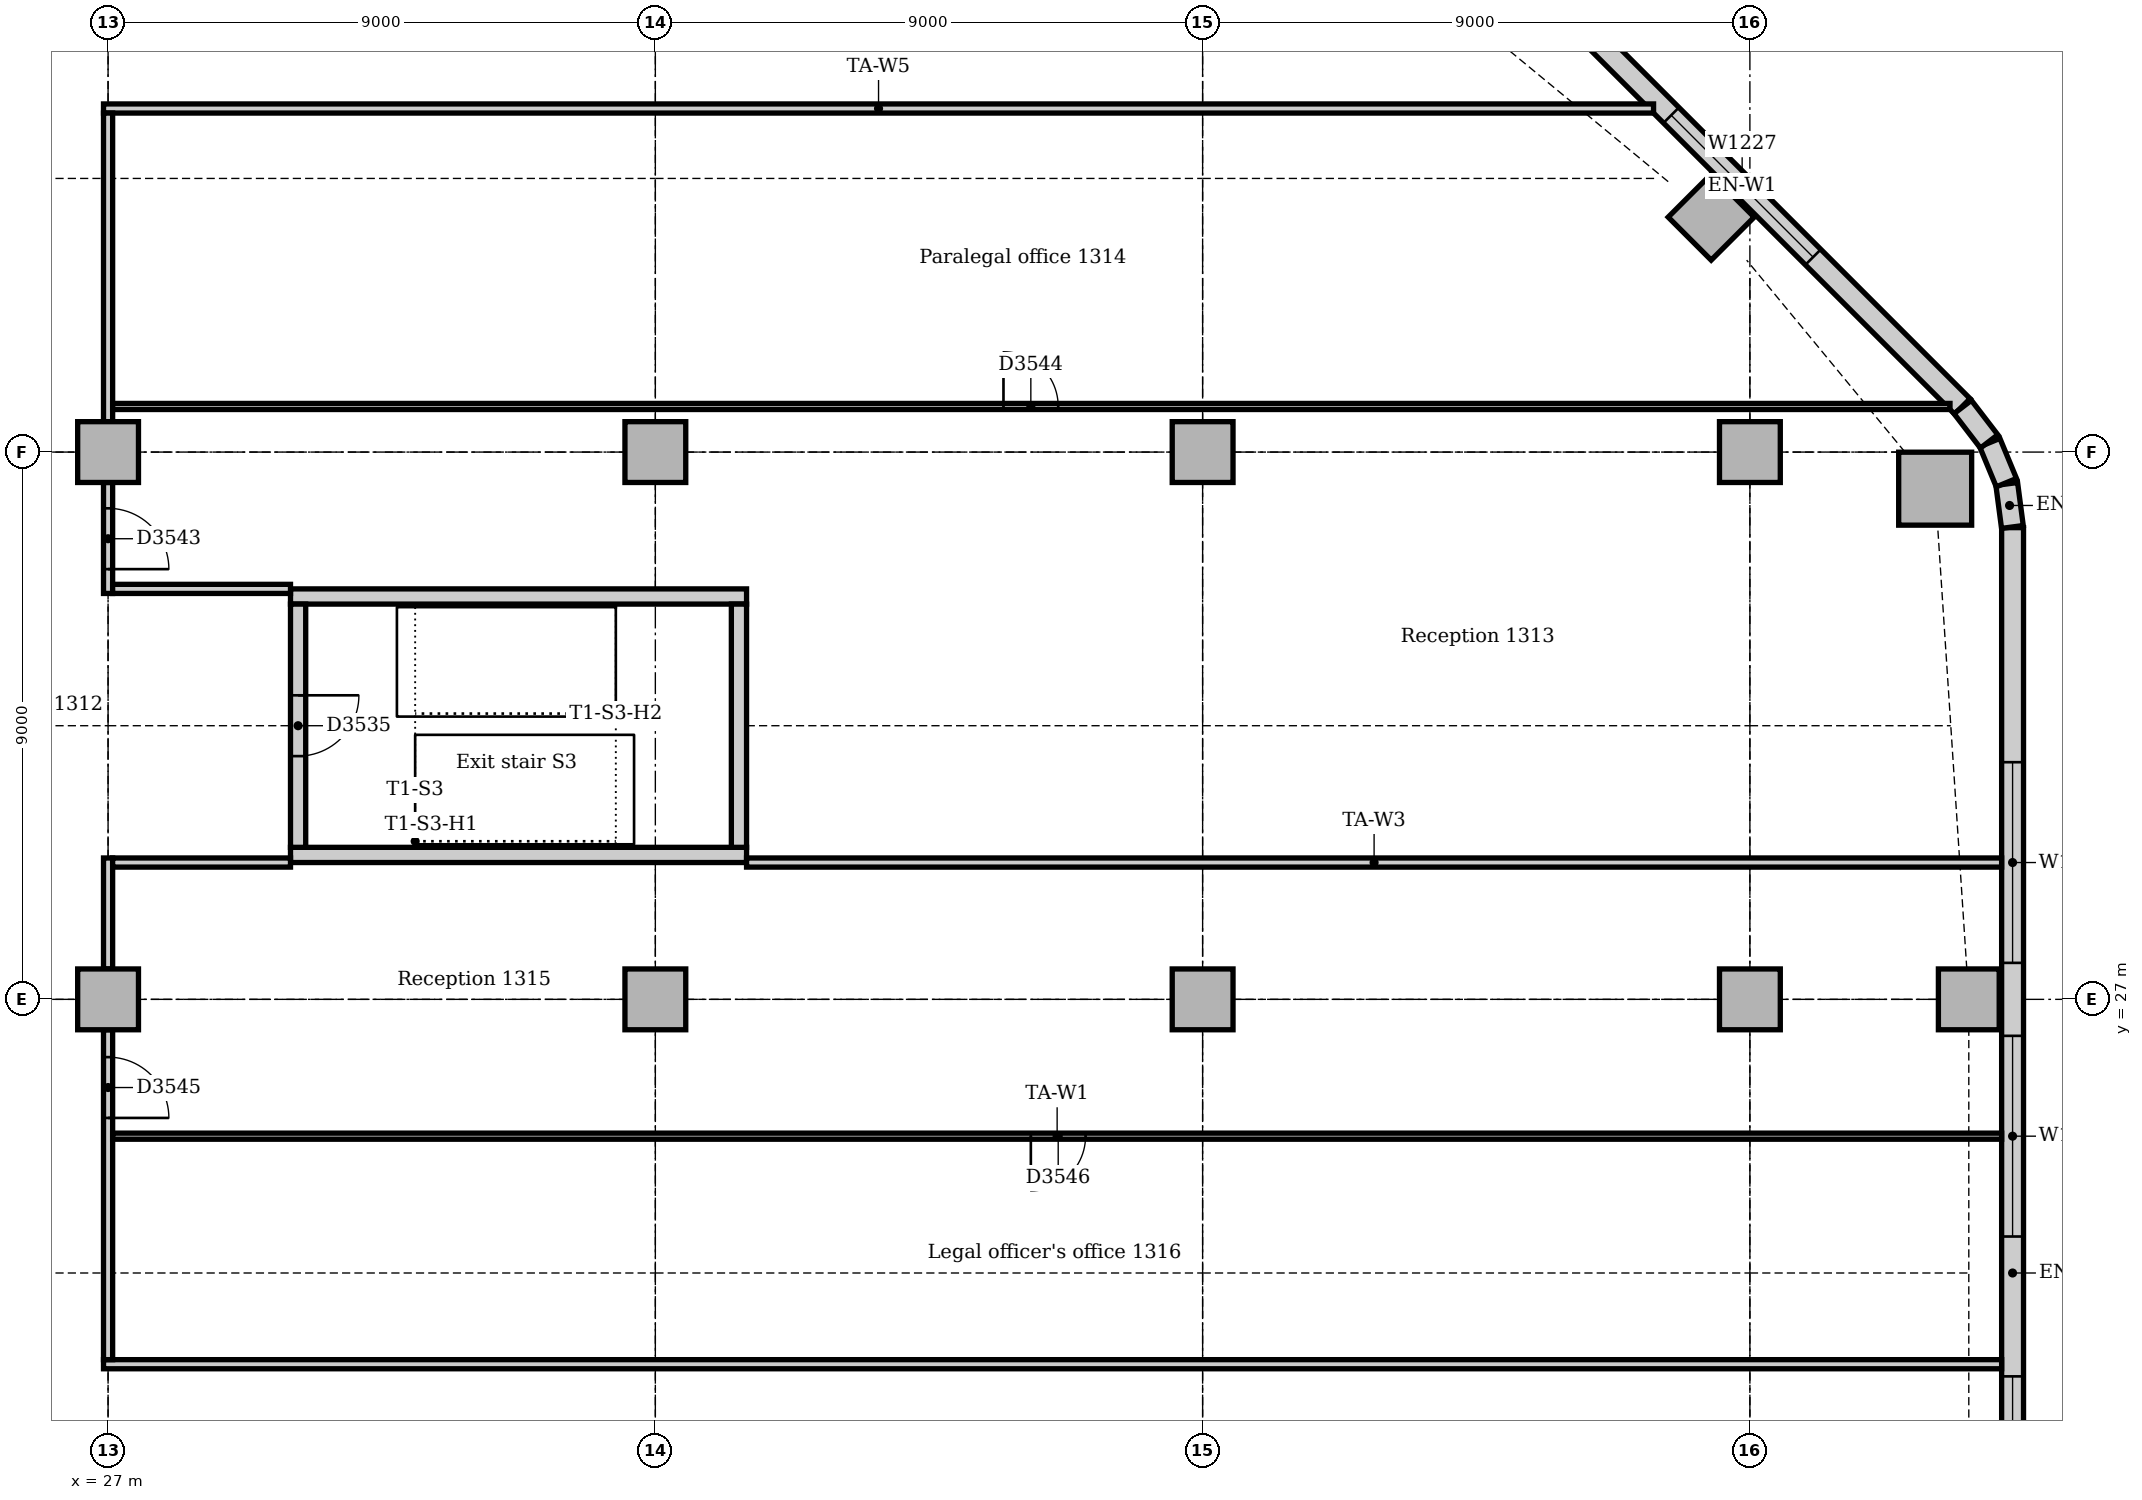
"""IFC4 building model, lengths in metres.
Left out: names, types, materials, properties, quantities, classifications, styles, units other than length and angle.
Written with IfcOpenShell. Run it as: python <this file> out.ifc"""

import sys

from ifc_helpers import new_model, si_unit, direction, frame, frame_2d, origin, origin_2d, place, context, subcontext, project, spatial, rectangle, extrude, element, fill, save


model = new_model("IFC4")
c1 = context("Model", 3, precision=1e-05, world=origin(), true_north=direction((0.0, 1.0)))
c2 = subcontext(c1, "Body", "Model", "MODEL_VIEW")
j1 = project(units=[si_unit("LENGTHUNIT", "METRE"), si_unit("PLANEANGLEUNIT", "RADIAN")], contexts=[c1])
p1 = place(None, origin())
s1 = spatial("IfcSite", under=j1, at=p1, CompositionType="ELEMENT")
p2 = place(p1, origin())
s2 = spatial("IfcBuilding", under=s1, at=p2, CompositionType="ELEMENT")
p3 = place(p2, frame((0.0, 0.0, 59.0)))
s3 = spatial("IfcBuildingStorey", under=s2, at=p3, CompositionType="ELEMENT", Elevation=59.0)
for number, where, z_axis, x_axis in (
    (1, (30.0, 29.375, 0.0), (0.0, 0.0, 1.0), (1.0, 0.0, 0.0)),
    (2, (37.5, 33.625, 0.0), (0.0, 0.0, 1.0), (-1.0, 0.0, 0.0)),
):
    element("IfcWall", number, at=place(p3, frame(where, z_axis=z_axis, x_axis=x_axis)), inside=s3, PredefinedType="SOLIDWALL", context=c2, shape_type="SweptSolid", body=[
        extrude(rectangle(XDim=7.5, YDim=0.25, at=frame_2d((3.75, 0.0))), origin(), (0.0, 0.0, 1.0), 4.0),
    ])
p4 = place(p3, frame((37.375, 29.5, 0.0), z_axis=(0.0, 0.0, 1.0), x_axis=(0.0, 1.0, 0.0)))
e3 = element("IfcWall", 3, at=p4, inside=s3, PredefinedType="SOLIDWALL", context=c2, shape_type="SweptSolid", body=[
    extrude(rectangle(XDim=4.0, YDim=0.25, at=frame_2d((2.0, 0.0))), origin(), (0.0, 0.0, 1.0), 4.0),
])
p5 = place(p3, frame((30.125, 33.5, 0.0), z_axis=(0.0, 0.0, 1.0), x_axis=(0.0, -1.0, 0.0)))
e4 = element("IfcWall", 4, at=p5, inside=s3, PredefinedType="SOLIDWALL", context=c2, shape_type="SweptSolid", body=[
    extrude(rectangle(XDim=4.0, YDim=0.25, at=frame_2d((2.0, 0.0))), origin(), (0.0, 0.0, 1.0), 4.0),
])
p6 = place(p5, frame((1.5, 0.0, 0.0)))
e5 = element("IfcOpeningElement", 5, at=p6, cuts=e4, PredefinedType="OPENING", context=c2, shape_type="SweptSolid", body=[
    extrude(rectangle(XDim=1.0, YDim=2.1, at=frame_2d((0.5, 1.05))), frame((0.0, 0.135, 0.0), z_axis=(0.0, -1.0, 0.0), x_axis=(1.0, 0.0, 0.0)), (0.0, 0.0, 1.0), 0.27),
])
p7 = place(p3, frame((57.047, 35.398, 0.0), z_axis=(0.0, 0.0, 1.0), x_axis=(1.0, 0.0, 0.0)))
e6 = element("IfcColumn", 6, at=p7, inside=s3, PredefinedType="COLUMN", context=c2, shape_type="SweptSolid", body=[
    extrude(rectangle(XDim=1.2, YDim=1.2, at=origin_2d()), origin(), (0.0, 0.0, 1.0), 3.85),
])
for number, where, z_axis, x_axis in (
    (7, (57.6, 27.0, 0.0), (0.0, 0.0, 1.0), (1.0, 0.0, 0.0)),
    (8, (53.364, 39.864, 0.0), (0.0, 0.0, 1.0), (0.707, 0.707, 0.0)),
    (9, (27.0, 27.0, 0.0), (0.0, 0.0, 1.0), (1.0, 0.0, 0.0)),
    (10, (27.0, 36.0, 0.0), (0.0, 0.0, 1.0), (1.0, 0.0, 0.0)),
    (11, (36.0, 27.0, 0.0), (0.0, 0.0, 1.0), (1.0, 0.0, 0.0)),
    (12, (36.0, 36.0, 0.0), (0.0, 0.0, 1.0), (1.0, 0.0, 0.0)),
    (13, (45.0, 27.0, 0.0), (0.0, 0.0, 1.0), (1.0, 0.0, 0.0)),
    (14, (45.0, 36.0, 0.0), (0.0, 0.0, 1.0), (1.0, 0.0, 0.0)),
    (15, (54.0, 27.0, 0.0), (0.0, 0.0, 1.0), (1.0, 0.0, 0.0)),
    (16, (54.0, 36.0, 0.0), (0.0, 0.0, 1.0), (1.0, 0.0, 0.0)),
):
    element("IfcColumn", number, at=place(p3, frame(where, z_axis=z_axis, x_axis=x_axis)), inside=s3, PredefinedType="COLUMN", context=c2, shape_type="SweptSolid", body=[
        extrude(rectangle(XDim=1.0, YDim=1.0, at=origin_2d()), origin(), (0.0, 0.0, 1.0), 3.85),
    ])
p8 = place(p3, frame((58.32, 10.243, 0.0), z_axis=(0.0, 0.0, 1.0), x_axis=(0.0, 1.0, 0.0)))
e17 = element("IfcWall", 17, at=p8, inside=s3, PredefinedType="STANDARD", context=c2, shape_type="SweptSolid", body=[
    extrude(rectangle(XDim=24.515, YDim=0.36, at=frame_2d((12.257, 0.0))), origin(), (0.0, 0.0, 1.0), 3.85),
])
p9 = place(p8, frame((3.857, 0.0, 0.9)))
e18 = element("IfcOpeningElement", 18, at=p9, cuts=e17, PredefinedType="OPENING", context=c2, shape_type="SweptSolid", body=[
    extrude(rectangle(XDim=3.3, YDim=1.6, at=frame_2d((1.65, 0.8))), frame((0.0, 0.19, 0.0), z_axis=(0.0, -1.0, 0.0), x_axis=(1.0, 0.0, 0.0)), (0.0, 0.0, 1.0), 0.38),
])
p10 = place(p8, frame((8.757, 0.0, 0.9)))
e19 = element("IfcOpeningElement", 19, at=p10, cuts=e17, PredefinedType="OPENING", context=c2, shape_type="SweptSolid", body=[
    extrude(rectangle(XDim=1.8, YDim=1.6, at=frame_2d((0.9, 0.8))), frame((0.0, 0.19, 0.0), z_axis=(0.0, -1.0, 0.0), x_axis=(1.0, 0.0, 0.0)), (0.0, 0.0, 1.0), 0.38),
])
p11 = place(p8, frame((12.857, 0.0, 0.9)))
e20 = element("IfcOpeningElement", 20, at=p11, cuts=e17, PredefinedType="OPENING", context=c2, shape_type="SweptSolid", body=[
    extrude(rectangle(XDim=3.3, YDim=1.6, at=frame_2d((1.65, 0.8))), frame((0.0, 0.19, 0.0), z_axis=(0.0, -1.0, 0.0), x_axis=(1.0, 0.0, 0.0)), (0.0, 0.0, 1.0), 0.38),
])
p12 = place(p8, frame((17.357, 0.0, 0.9)))
e21 = element("IfcOpeningElement", 21, at=p12, cuts=e17, PredefinedType="OPENING", context=c2, shape_type="SweptSolid", body=[
    extrude(rectangle(XDim=3.3, YDim=1.6, at=frame_2d((1.65, 0.8))), frame((0.0, 0.19, 0.0), z_axis=(0.0, -1.0, 0.0), x_axis=(1.0, 0.0, 0.0)), (0.0, 0.0, 1.0), 0.38),
])
p13 = place(p3, frame((57.494, 36.751, 0.0), z_axis=(0.0, 0.0, 1.0), x_axis=(-0.707106781187, 0.707106781187, 0.0)))
e22 = element("IfcWall", 22, at=p13, inside=s3, PredefinedType="STANDARD", context=c2, shape_type="SweptSolid", body=[
    extrude(rectangle(XDim=10.243, YDim=0.36, at=frame_2d((5.121, 0.0))), origin(), (0.0, 0.0, 1.0), 3.85),
])
p14 = place(p13, frame((3.471, 0.0, 0.9)))
e23 = element("IfcOpeningElement", 23, at=p14, cuts=e22, PredefinedType="OPENING", context=c2, shape_type="SweptSolid", body=[
    extrude(rectangle(XDim=3.3, YDim=1.6, at=frame_2d((1.65, 0.8))), frame((0.0, 0.19, 0.0), z_axis=(0.0, -1.0, 0.0), x_axis=(1.0, 0.0, 0.0)), (0.0, 0.0, 1.0), 0.38),
])
for number, where, z_axis, x_axis in (
    (24, (58.317, 34.769, 0.0), (0.0, 0.0, 1.0), (-0.131, 0.991, 0.0)),
    (25, (58.218, 35.497, 0.0), (0.0, 0.0, 1.0), (-0.383, 0.924, 0.0)),
):
    element("IfcWall", number, at=place(p3, frame(where, z_axis=z_axis, x_axis=x_axis)), inside=s3, PredefinedType="STANDARD", context=c2, shape_type="SweptSolid", body=[
        extrude(rectangle(XDim=0.713, YDim=0.36, at=frame_2d((0.356, 0.0))), origin(), (0.0, 0.0, 1.0), 3.85),
    ])
p15 = place(p3, frame((57.934, 36.175, 0.0), z_axis=(0.0, 0.0, 1.0), x_axis=(-0.608802368033, 0.793321924995, 0.0)))
e26 = element("IfcWall", 26, at=p15, inside=s3, PredefinedType="STANDARD", context=c2, shape_type="SweptSolid", body=[
    extrude(rectangle(XDim=0.713, YDim=0.36, at=frame_2d((0.357, 0.0))), origin(), (0.0, 0.0, 1.0), 3.85),
])
p16 = place(p3, frame((26.925, 21.0, 0.0), z_axis=(0.0, 0.0, 1.0), x_axis=(1.0, 0.0, 0.0)))
e27 = element("IfcWall", 27, at=p16, inside=s3, PredefinedType="PARTITIONING", context=c2, shape_type="SweptSolid", body=[
    extrude(rectangle(XDim=31.215, YDim=0.15, at=frame_2d((15.607, 0.0))), origin(), (0.0, 0.0, 1.0), 3.85),
])
p17 = place(p3, frame((26.925, 41.65, 0.0), z_axis=(0.0, 0.0, 1.0), x_axis=(1.0, 0.0, 0.0)))
e28 = element("IfcWall", 28, at=p17, inside=s3, PredefinedType="PARTITIONING", context=c2, shape_type="SweptSolid", body=[
    extrude(rectangle(XDim=25.491, YDim=0.15, at=frame_2d((12.745, 0.0))), origin(), (0.0, 0.0, 1.0), 3.85),
])
p18 = place(p3, frame((27.0, 21.075, 0.0), z_axis=(0.0, 0.0, 1.0), x_axis=(0.0, 1.0, 0.0)))
e29 = element("IfcWall", 29, at=p18, inside=s3, PredefinedType="PARTITIONING", context=c2, shape_type="SweptSolid", body=[
    extrude(rectangle(XDim=5.425, YDim=0.15, at=frame_2d((2.712, 0.0))), origin(), (0.0, 0.0, 1.0), 3.158),
])
p19 = place(p18, frame((3.975, 0.0, 0.0)))
e30 = element("IfcOpeningElement", 30, at=p19, cuts=e29, PredefinedType="OPENING", context=c2, shape_type="SweptSolid", body=[
    extrude(rectangle(XDim=1.0, YDim=2.1, at=frame_2d((0.5, 1.05))), frame((0.0, 0.085, 0.0), z_axis=(0.0, -1.0, 0.0), x_axis=(1.0, 0.0, 0.0)), (0.0, 0.0, 1.0), 0.17),
])
p20 = place(p3, frame((27.0, 27.5, 0.0), z_axis=(0.0, 0.0, 1.0), x_axis=(0.0, 1.0, 0.0)))
e31 = element("IfcWall", 31, at=p20, inside=s3, PredefinedType="PARTITIONING", context=c2, shape_type="SweptSolid", body=[
    extrude(rectangle(XDim=1.825, YDim=0.15, at=frame_2d((0.912, 0.0))), origin(), (0.0, 0.0, 1.0), 3.158),
])
p21 = place(p3, frame((27.0, 33.675, 0.0), z_axis=(0.0, 0.0, 1.0), x_axis=(0.0, 1.0, 0.0)))
e32 = element("IfcWall", 32, at=p21, inside=s3, PredefinedType="PARTITIONING", context=c2, shape_type="SweptSolid", body=[
    extrude(rectangle(XDim=1.825, YDim=0.15, at=frame_2d((0.912, 0.0))), origin(), (0.0, 0.0, 1.0), 3.158),
])
p22 = place(p21, frame((0.4, 0.0, 0.0)))
e33 = element("IfcOpeningElement", 33, at=p22, cuts=e32, PredefinedType="OPENING", context=c2, shape_type="SweptSolid", body=[
    extrude(rectangle(XDim=1.0, YDim=2.1, at=frame_2d((0.5, 1.05))), frame((0.0, 0.085, 0.0), z_axis=(0.0, -1.0, 0.0), x_axis=(1.0, 0.0, 0.0)), (0.0, 0.0, 1.0), 0.17),
])
p23 = place(p3, frame((27.0, 36.5, 0.0), z_axis=(0.0, 0.0, 1.0), x_axis=(0.0, 1.0, 0.0)))
e34 = element("IfcWall", 34, at=p23, inside=s3, PredefinedType="PARTITIONING", context=c2, shape_type="SweptSolid", body=[
    extrude(rectangle(XDim=5.075, YDim=0.15, at=frame_2d((2.538, 0.0))), origin(), (0.0, 0.0, 1.0), 3.158),
])
for number, where, z_axis, x_axis in (
    (35, (27.075, 29.25, 0.0), (0.0, 0.0, 1.0), (1.0, 0.0, 0.0)),
    (36, (27.075, 33.75, 0.0), (0.0, 0.0, 1.0), (1.0, 0.0, 0.0)),
):
    element("IfcWall", number, at=place(p3, frame(where, z_axis=z_axis, x_axis=x_axis)), inside=s3, PredefinedType="PARTITIONING", context=c2, shape_type="SweptSolid", body=[
        extrude(rectangle(XDim=2.925, YDim=0.15, at=frame_2d((1.462, 0.0))), origin(), (0.0, 0.0, 1.0), 3.85),
    ])
p24 = place(p3, frame((37.5, 29.25, 0.0), z_axis=(0.0, 0.0, 1.0), x_axis=(1.0, 0.0, 0.0)))
e37 = element("IfcWall", 37, at=p24, inside=s3, PredefinedType="PARTITIONING", context=c2, shape_type="SweptSolid", body=[
    extrude(rectangle(XDim=20.64, YDim=0.15, at=frame_2d((10.32, 0.0))), origin(), (0.0, 0.0, 1.0), 3.85),
])
p25 = place(p3, frame((27.075, 24.75, 0.0), z_axis=(0.0, 0.0, 1.0), x_axis=(1.0, 0.0, 0.0)))
e38 = element("IfcWall", 38, at=p25, inside=s3, PredefinedType="PARTITIONING", context=c2, shape_type="SweptSolid", body=[
    extrude(rectangle(XDim=31.065, YDim=0.1, at=frame_2d((15.533, 0.0))), origin(), (0.0, 0.0, 1.0), 3.85),
])
p26 = place(p25, frame((15.1, 0.0, 0.0)))
e39 = element("IfcOpeningElement", 39, at=p26, cuts=e38, PredefinedType="OPENING", context=c2, shape_type="SweptSolid", body=[
    extrude(rectangle(XDim=0.9, YDim=2.1, at=frame_2d((0.45, 1.05))), frame((0.0, 0.06, 0.0), z_axis=(0.0, -1.0, 0.0), x_axis=(1.0, 0.0, 0.0)), (0.0, 0.0, 1.0), 0.12),
])
p27 = place(p3, frame((27.075, 36.75, 0.0), z_axis=(0.0, 0.0, 1.0), x_axis=(1.0, 0.0, 0.0)))
e40 = element("IfcWall", 40, at=p27, inside=s3, PredefinedType="PARTITIONING", context=c2, shape_type="SweptSolid", body=[
    extrude(rectangle(XDim=30.216, YDim=0.1, at=frame_2d((15.108, 0.0))), origin(), (0.0, 0.0, 1.0), 3.85),
])
p28 = place(p27, frame((14.65, 0.0, 0.0)))
e41 = element("IfcOpeningElement", 41, at=p28, cuts=e40, PredefinedType="OPENING", context=c2, shape_type="SweptSolid", body=[
    extrude(rectangle(XDim=0.9, YDim=2.1, at=frame_2d((0.45, 1.05))), frame((0.0, 0.06, 0.0), z_axis=(0.0, -1.0, 0.0), x_axis=(1.0, 0.0, 0.0)), (0.0, 0.0, 1.0), 0.12),
])
p29 = place(p10, origin())
e42 = element("IfcWindow", 42, at=p29, inside=s3, PartitioningType="SINGLE_PANEL", PredefinedType="WINDOW", context=c2, shape_type="SweptSolid", body=[
    extrude(rectangle(XDim=1.8, YDim=1.6, at=frame_2d((0.9, 0.8))), frame((0.0, 0.13, 0.0), z_axis=(0.0, -1.0, 0.0), x_axis=(1.0, 0.0, 0.0)), (0.0, 0.0, 1.0), 0.06),
])
fill(e19, e42)
p30 = place(p11, origin())
e43 = element("IfcWindow", 43, at=p30, inside=s3, PartitioningType="SINGLE_PANEL", PredefinedType="WINDOW", context=c2, shape_type="SweptSolid", body=[
    extrude(rectangle(XDim=3.3, YDim=1.6, at=frame_2d((1.65, 0.8))), frame((0.0, 0.13, 0.0), z_axis=(0.0, -1.0, 0.0), x_axis=(1.0, 0.0, 0.0)), (0.0, 0.0, 1.0), 0.06),
])
fill(e20, e43)
p31 = place(p12, origin())
e44 = element("IfcWindow", 44, at=p31, inside=s3, PartitioningType="SINGLE_PANEL", PredefinedType="WINDOW", context=c2, shape_type="SweptSolid", body=[
    extrude(rectangle(XDim=3.3, YDim=1.6, at=frame_2d((1.65, 0.8))), frame((0.0, 0.13, 0.0), z_axis=(0.0, -1.0, 0.0), x_axis=(1.0, 0.0, 0.0)), (0.0, 0.0, 1.0), 0.06),
])
fill(e21, e44)
p32 = place(p14, origin())
e45 = element("IfcWindow", 45, at=p32, inside=s3, PartitioningType="SINGLE_PANEL", PredefinedType="WINDOW", context=c2, shape_type="SweptSolid", body=[
    extrude(rectangle(XDim=3.3, YDim=1.6, at=frame_2d((1.65, 0.8))), frame((0.0, 0.13, 0.0), z_axis=(0.0, -1.0, 0.0), x_axis=(1.0, 0.0, 0.0)), (0.0, 0.0, 1.0), 0.06),
])
fill(e23, e45)
p33 = place(p6, origin())
e46 = element("IfcDoor", 46, at=p33, inside=s3, OperationType="SINGLE_SWING_LEFT", PredefinedType="DOOR", context=c2, shape_type="SweptSolid", body=[
    extrude(rectangle(XDim=1.0, YDim=2.1, at=frame_2d((0.5, 1.05))), frame((0.0, 0.025, 0.0), z_axis=(0.0, -1.0, 0.0), x_axis=(1.0, 0.0, 0.0)), (0.0, 0.0, 1.0), 0.05),
])
fill(e5, e46)
p34 = place(p22, frame((1.0, 0.0, 0.0), z_axis=(0.0, 0.0, 1.0), x_axis=(-1.0, 0.0, 0.0)))
e47 = element("IfcDoor", 47, at=p34, inside=s3, OperationType="SINGLE_SWING_RIGHT", PredefinedType="DOOR", context=c2, shape_type="SweptSolid", body=[
    extrude(rectangle(XDim=1.0, YDim=2.1, at=frame_2d((0.5, 1.05))), frame((0.0, 0.025, 0.0), z_axis=(0.0, -1.0, 0.0), x_axis=(1.0, 0.0, 0.0)), (0.0, 0.0, 1.0), 0.05),
])
fill(e33, e47)
p35 = place(p28, origin())
e48 = element("IfcDoor", 48, at=p35, inside=s3, OperationType="SINGLE_SWING_LEFT", PredefinedType="DOOR", context=c2, shape_type="SweptSolid", body=[
    extrude(rectangle(XDim=0.9, YDim=2.1, at=frame_2d((0.45, 1.05))), frame((0.0, 0.025, 0.0), z_axis=(0.0, -1.0, 0.0), x_axis=(1.0, 0.0, 0.0)), (0.0, 0.0, 1.0), 0.05),
])
fill(e41, e48)
p36 = place(p19, frame((1.0, 0.0, 0.0), z_axis=(0.0, 0.0, 1.0), x_axis=(-1.0, 0.0, 0.0)))
e49 = element("IfcDoor", 49, at=p36, inside=s3, OperationType="SINGLE_SWING_RIGHT", PredefinedType="DOOR", context=c2, shape_type="SweptSolid", body=[
    extrude(rectangle(XDim=1.0, YDim=2.1, at=frame_2d((0.5, 1.05))), frame((0.0, 0.025, 0.0), z_axis=(0.0, -1.0, 0.0), x_axis=(1.0, 0.0, 0.0)), (0.0, 0.0, 1.0), 0.05),
])
fill(e30, e49)
p37 = place(p26, frame((0.9, 0.0, 0.0), z_axis=(0.0, 0.0, 1.0), x_axis=(-1.0, 0.0, 0.0)))
e50 = element("IfcDoor", 50, at=p37, inside=s3, OperationType="SINGLE_SWING_RIGHT", PredefinedType="DOOR", context=c2, shape_type="SweptSolid", body=[
    extrude(rectangle(XDim=0.9, YDim=2.1, at=frame_2d((0.45, 1.05))), frame((0.0, 0.025, 0.0), z_axis=(0.0, -1.0, 0.0), x_axis=(1.0, 0.0, 0.0)), (0.0, 0.0, 1.0), 0.05),
])
fill(e39, e50)
save(model, sys.argv[1])
